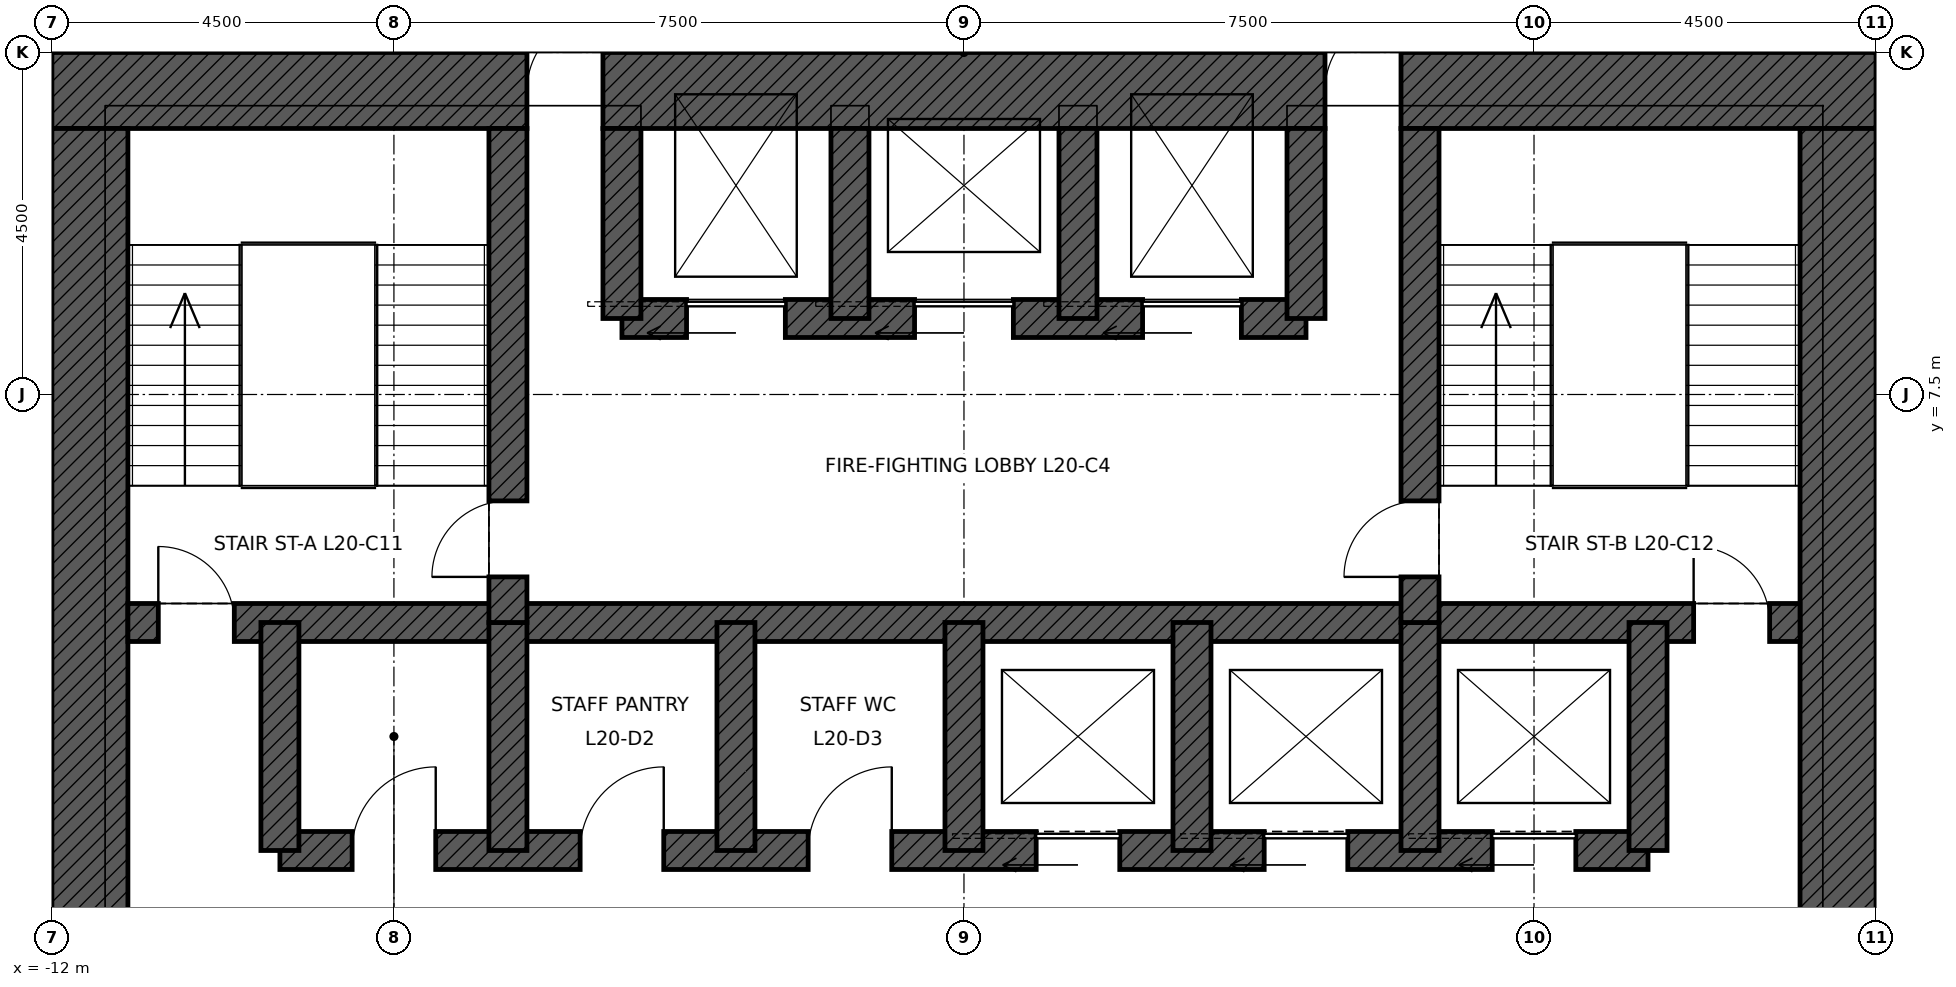
"""IFC4 building model, lengths in metres.
Left out: names, types, materials, properties, quantities, classifications, styles, units other than length and angle.
Written with IfcOpenShell. Run it as: python <this file> out.ifc"""

import sys

from ifc_helpers import new_model, si_unit, direction, frame, frame_2d, origin, place, context, subcontext, project, spatial, rectangle, extrude, element, fill, save


model = new_model("IFC4")
c1 = context("Model", 3, precision=1e-05, world=origin(), true_north=direction((0.0, 1.0)))
c2 = subcontext(c1, "Body", "Model", "MODEL_VIEW")
j1 = project(units=[si_unit("LENGTHUNIT", "METRE"), si_unit("PLANEANGLEUNIT", "RADIAN")], contexts=[c1])
p1 = place(None, origin())
s1 = spatial("IfcSite", under=j1, at=p1, CompositionType="ELEMENT")
p2 = place(p1, origin())
s2 = spatial("IfcBuilding", under=s1, at=p2, CompositionType="ELEMENT")
p3 = place(p2, frame((0.0, 0.0, 104.4)))
s3 = spatial("IfcBuildingStorey", under=s2, at=p3, CompositionType="ELEMENT", Elevation=104.4)
p4 = place(p3, frame((-12.0, 11.5, 0.0), z_axis=(0.0, 0.0, 1.0), x_axis=(1.0, 0.0, 0.0)))
e1 = element("IfcWall", 1, at=p4, inside=s3, PredefinedType="SHEAR", context=c2, shape_type="SweptSolid", body=[
    extrude(rectangle(XDim=24.0, YDim=1.0, at=frame_2d((12.0, 0.0))), origin(), (0.0, 0.0, 1.0), 4.5),
])
p5 = place(p4, frame((6.25, 0.0, 0.0)))
e2 = element("IfcOpeningElement", 2, at=p5, cuts=e1, PredefinedType="OPENING", context=c2, shape_type="SweptSolid", body=[
    extrude(rectangle(XDim=1.0, YDim=2.4, at=frame_2d((0.5, 1.2))), frame((0.0, 0.51, 0.0), z_axis=(0.0, -1.0, 0.0), x_axis=(1.0, 0.0, 0.0)), (0.0, 0.0, 1.0), 1.02),
])
p6 = place(p4, frame((16.75, 0.0, 0.0)))
e3 = element("IfcOpeningElement", 3, at=p6, cuts=e1, PredefinedType="OPENING", context=c2, shape_type="SweptSolid", body=[
    extrude(rectangle(XDim=1.0, YDim=2.4, at=frame_2d((0.5, 1.2))), frame((0.0, 0.51, 0.0), z_axis=(0.0, -1.0, 0.0), x_axis=(1.0, 0.0, 0.0)), (0.0, 0.0, 1.0), 1.02),
])
p7 = place(p3, frame((11.5, 11.0, 0.0), z_axis=(0.0, 0.0, 1.0), x_axis=(0.0, -1.0, 0.0)))
e4 = element("IfcWall", 4, at=p7, inside=s3, PredefinedType="SHEAR", context=c2, shape_type="SweptSolid", body=[
    extrude(rectangle(XDim=22.0, YDim=1.0, at=frame_2d((11.0, 0.0))), origin(), (0.0, 0.0, 1.0), 4.5),
])
p8 = place(p7, frame((10.5, 0.0, 0.0)))
e5 = element("IfcOpeningElement", 5, at=p8, cuts=e4, PredefinedType="OPENING", context=c2, shape_type="SweptSolid", body=[
    extrude(rectangle(XDim=1.0, YDim=2.4, at=frame_2d((0.5, 1.2))), frame((0.0, 0.51, 0.0), z_axis=(0.0, -1.0, 0.0), x_axis=(1.0, 0.0, 0.0)), (0.0, 0.0, 1.0), 1.02),
])
p9 = place(p3, frame((-11.5, -11.0, 0.0), z_axis=(0.0, 0.0, 1.0), x_axis=(0.0, 1.0, 0.0)))
e6 = element("IfcWall", 6, at=p9, inside=s3, PredefinedType="SHEAR", context=c2, shape_type="SweptSolid", body=[
    extrude(rectangle(XDim=22.0, YDim=1.0, at=frame_2d((11.0, 0.0))), origin(), (0.0, 0.0, 1.0), 4.5),
])
p10 = place(p9, frame((10.5, 0.0, 0.0)))
e7 = element("IfcOpeningElement", 7, at=p10, cuts=e6, PredefinedType="OPENING", context=c2, shape_type="SweptSolid", body=[
    extrude(rectangle(XDim=1.0, YDim=2.4, at=frame_2d((0.5, 1.2))), frame((0.0, 0.51, 0.0), z_axis=(0.0, -1.0, 0.0), x_axis=(1.0, 0.0, 0.0)), (0.0, 0.0, 1.0), 1.02),
])
p11 = place(p3, frame((-11.0, 4.5, 0.0), z_axis=(0.0, 0.0, 1.0), x_axis=(1.0, 0.0, 0.0)))
e8 = element("IfcWall", 8, at=p11, inside=s3, PredefinedType="SHEAR", context=c2, shape_type="SweptSolid", body=[
    extrude(rectangle(XDim=22.0, YDim=0.5, at=frame_2d((11.0, 0.0))), origin(), (0.0, 0.0, 1.0), 4.5),
])
p12 = place(p11, frame((0.4, 0.0, 0.0)))
e9 = element("IfcOpeningElement", 9, at=p12, cuts=e8, PredefinedType="OPENING", context=c2, shape_type="SweptSolid", body=[
    extrude(rectangle(XDim=1.0, YDim=2.1, at=frame_2d((0.5, 1.05))), frame((0.0, 0.26, 0.0), z_axis=(0.0, -1.0, 0.0), x_axis=(1.0, 0.0, 0.0)), (0.0, 0.0, 1.0), 0.52),
])
p13 = place(p11, frame((20.6, 0.0, 0.0)))
e10 = element("IfcOpeningElement", 10, at=p13, cuts=e8, PredefinedType="OPENING", context=c2, shape_type="SweptSolid", body=[
    extrude(rectangle(XDim=1.0, YDim=2.1, at=frame_2d((0.5, 1.05))), frame((0.0, 0.26, 0.0), z_axis=(0.0, -1.0, 0.0), x_axis=(1.0, 0.0, 0.0)), (0.0, 0.0, 1.0), 0.52),
])
p14 = place(p3, frame((-9.0, 1.5, 0.0), z_axis=(0.0, 0.0, 1.0), x_axis=(1.0, 0.0, 0.0)))
e11 = element("IfcWall", 11, at=p14, inside=s3, PredefinedType="SHEAR", context=c2, shape_type="SweptSolid", body=[
    extrude(rectangle(XDim=18.0, YDim=0.5, at=frame_2d((9.0, 0.0))), origin(), (0.0, 0.0, 1.0), 4.5),
])
p15 = place(p14, frame((9.95, 0.0, 0.0)))
e12 = element("IfcOpeningElement", 12, at=p15, cuts=e11, PredefinedType="OPENING", context=c2, shape_type="SweptSolid", body=[
    extrude(rectangle(XDim=1.1, YDim=2.1, at=frame_2d((0.55, 1.05))), frame((0.0, 0.26, 0.0), z_axis=(0.0, -1.0, 0.0), x_axis=(1.0, 0.0, 0.0)), (0.0, 0.0, 1.0), 0.52),
])
p16 = place(p14, frame((12.95, 0.0, 0.0)))
e13 = element("IfcOpeningElement", 13, at=p16, cuts=e11, PredefinedType="OPENING", context=c2, shape_type="SweptSolid", body=[
    extrude(rectangle(XDim=1.1, YDim=2.1, at=frame_2d((0.55, 1.05))), frame((0.0, 0.26, 0.0), z_axis=(0.0, -1.0, 0.0), x_axis=(1.0, 0.0, 0.0)), (0.0, 0.0, 1.0), 0.52),
])
p17 = place(p14, frame((15.95, 0.0, 0.0)))
e14 = element("IfcOpeningElement", 14, at=p17, cuts=e11, PredefinedType="OPENING", context=c2, shape_type="SweptSolid", body=[
    extrude(rectangle(XDim=1.1, YDim=2.1, at=frame_2d((0.55, 1.05))), frame((0.0, 0.26, 0.0), z_axis=(0.0, -1.0, 0.0), x_axis=(1.0, 0.0, 0.0)), (0.0, 0.0, 1.0), 0.52),
])
p18 = place(p14, frame((0.95, 0.0, 0.0)))
e15 = element("IfcOpeningElement", 15, at=p18, cuts=e11, PredefinedType="OPENING", context=c2, shape_type="SweptSolid", body=[
    extrude(rectangle(XDim=1.1, YDim=2.1, at=frame_2d((0.55, 1.05))), frame((0.0, 0.26, 0.0), z_axis=(0.0, -1.0, 0.0), x_axis=(1.0, 0.0, 0.0)), (0.0, 0.0, 1.0), 0.52),
])
p19 = place(p14, frame((3.95, 0.0, 0.0)))
e16 = element("IfcOpeningElement", 16, at=p19, cuts=e11, PredefinedType="OPENING", context=c2, shape_type="SweptSolid", body=[
    extrude(rectangle(XDim=1.1, YDim=2.1, at=frame_2d((0.55, 1.05))), frame((0.0, 0.26, 0.0), z_axis=(0.0, -1.0, 0.0), x_axis=(1.0, 0.0, 0.0)), (0.0, 0.0, 1.0), 0.52),
])
p20 = place(p14, frame((6.95, 0.0, 0.0)))
e17 = element("IfcOpeningElement", 17, at=p20, cuts=e11, PredefinedType="OPENING", context=c2, shape_type="SweptSolid", body=[
    extrude(rectangle(XDim=1.1, YDim=2.1, at=frame_2d((0.55, 1.05))), frame((0.0, 0.26, 0.0), z_axis=(0.0, -1.0, 0.0), x_axis=(1.0, 0.0, 0.0)), (0.0, 0.0, 1.0), 0.52),
])
p21 = place(p3, frame((-4.5, 8.5, 0.0), z_axis=(0.0, 0.0, 1.0), x_axis=(1.0, 0.0, 0.0)))
e18 = element("IfcWall", 18, at=p21, inside=s3, PredefinedType="SHEAR", context=c2, shape_type="SweptSolid", body=[
    extrude(rectangle(XDim=9.0, YDim=0.5, at=frame_2d((4.5, 0.0))), origin(), (0.0, 0.0, 1.0), 4.5),
])
p22 = place(p21, frame((0.85, 0.0, 0.0)))
e19 = element("IfcOpeningElement", 19, at=p22, cuts=e18, PredefinedType="OPENING", context=c2, shape_type="SweptSolid", body=[
    extrude(rectangle(XDim=1.3, YDim=2.4, at=frame_2d((0.65, 1.2))), frame((0.0, 0.26, 0.0), z_axis=(0.0, -1.0, 0.0), x_axis=(1.0, 0.0, 0.0)), (0.0, 0.0, 1.0), 0.52),
])
p23 = place(p21, frame((6.85, 0.0, 0.0)))
e20 = element("IfcOpeningElement", 20, at=p23, cuts=e18, PredefinedType="OPENING", context=c2, shape_type="SweptSolid", body=[
    extrude(rectangle(XDim=1.3, YDim=2.4, at=frame_2d((0.65, 1.2))), frame((0.0, 0.26, 0.0), z_axis=(0.0, -1.0, 0.0), x_axis=(1.0, 0.0, 0.0)), (0.0, 0.0, 1.0), 0.52),
])
p24 = place(p21, frame((3.85, 0.0, 0.0)))
e21 = element("IfcOpeningElement", 21, at=p24, cuts=e18, PredefinedType="OPENING", context=c2, shape_type="SweptSolid", body=[
    extrude(rectangle(XDim=1.3, YDim=2.4, at=frame_2d((0.65, 1.2))), frame((0.0, 0.26, 0.0), z_axis=(0.0, -1.0, 0.0), x_axis=(1.0, 0.0, 0.0)), (0.0, 0.0, 1.0), 0.52),
])
for number, where, z_axis, x_axis in (
    (22, (-9.0, 1.5, 0.0), (0.0, 0.0, 1.0), (0.0, 1.0, 0.0)),
    (23, (9.0, 1.5, 0.0), (0.0, 0.0, 1.0), (0.0, 1.0, 0.0)),
    (24, (-6.0, 1.5, 0.0), (0.0, 0.0, 1.0), (0.0, 1.0, 0.0)),
    (25, (-3.0, 1.5, 0.0), (0.0, 0.0, 1.0), (0.0, 1.0, 0.0)),
    (26, (0.0, 1.5, 0.0), (0.0, 0.0, 1.0), (0.0, 1.0, 0.0)),
    (27, (3.0, 1.5, 0.0), (0.0, 0.0, 1.0), (0.0, 1.0, 0.0)),
    (28, (6.0, 1.5, 0.0), (0.0, 0.0, 1.0), (0.0, 1.0, 0.0)),
):
    element("IfcWall", number, at=place(p3, frame(where, z_axis=z_axis, x_axis=x_axis)), inside=s3, PredefinedType="SHEAR", context=c2, shape_type="SweptSolid", body=[
        extrude(rectangle(XDim=3.0, YDim=0.5, at=frame_2d((1.5, 0.0))), origin(), (0.0, 0.0, 1.0), 4.5),
    ])
p25 = place(p3, frame((-6.0, 4.5, 0.0), z_axis=(0.0, 0.0, 1.0), x_axis=(0.0, 1.0, 0.0)))
e29 = element("IfcWall", 29, at=p25, inside=s3, PredefinedType="SHEAR", context=c2, shape_type="SweptSolid", body=[
    extrude(rectangle(XDim=6.5, YDim=0.5, at=frame_2d((3.25, 0.0))), origin(), (0.0, 0.0, 1.0), 4.5),
])
p26 = place(p25, frame((0.6, 0.0, 0.0)))
e30 = element("IfcOpeningElement", 30, at=p26, cuts=e29, PredefinedType="OPENING", context=c2, shape_type="SweptSolid", body=[
    extrude(rectangle(XDim=1.0, YDim=2.1, at=frame_2d((0.5, 1.05))), frame((0.0, 0.26, 0.0), z_axis=(0.0, -1.0, 0.0), x_axis=(1.0, 0.0, 0.0)), (0.0, 0.0, 1.0), 0.52),
])
p27 = place(p3, frame((6.0, 4.5, 0.0), z_axis=(0.0, 0.0, 1.0), x_axis=(0.0, 1.0, 0.0)))
e31 = element("IfcWall", 31, at=p27, inside=s3, PredefinedType="SHEAR", context=c2, shape_type="SweptSolid", body=[
    extrude(rectangle(XDim=6.5, YDim=0.5, at=frame_2d((3.25, 0.0))), origin(), (0.0, 0.0, 1.0), 4.5),
])
p28 = place(p27, frame((0.6, 0.0, 0.0)))
e32 = element("IfcOpeningElement", 32, at=p28, cuts=e31, PredefinedType="OPENING", context=c2, shape_type="SweptSolid", body=[
    extrude(rectangle(XDim=1.0, YDim=2.1, at=frame_2d((0.5, 1.05))), frame((0.0, 0.26, 0.0), z_axis=(0.0, -1.0, 0.0), x_axis=(1.0, 0.0, 0.0)), (0.0, 0.0, 1.0), 0.52),
])
for number, where, z_axis, x_axis in (
    (33, (-4.5, 8.5, 0.0), (0.0, 0.0, 1.0), (0.0, 1.0, 0.0)),
    (34, (4.5, 8.5, 0.0), (0.0, 0.0, 1.0), (0.0, 1.0, 0.0)),
    (35, (-1.5, 8.5, 0.0), (0.0, 0.0, 1.0), (0.0, 1.0, 0.0)),
    (36, (1.5, 8.5, 0.0), (0.0, 0.0, 1.0), (0.0, 1.0, 0.0)),
):
    element("IfcWall", number, at=place(p3, frame(where, z_axis=z_axis, x_axis=x_axis)), inside=s3, PredefinedType="SHEAR", context=c2, shape_type="SweptSolid", body=[
        extrude(rectangle(XDim=2.5, YDim=0.5, at=frame_2d((1.25, 0.0))), origin(), (0.0, 0.0, 1.0), 4.5),
    ])
p29 = place(p12, origin())
e37 = element("IfcDoor", 37, at=p29, inside=s3, OperationType="SINGLE_SWING_LEFT", PredefinedType="DOOR", context=c2, shape_type="SweptSolid", body=[
    extrude(rectangle(XDim=1.0, YDim=2.1, at=frame_2d((0.5, 1.05))), frame((0.0, 0.025, 0.0), z_axis=(0.0, -1.0, 0.0), x_axis=(1.0, 0.0, 0.0)), (0.0, 0.0, 1.0), 0.05),
])
fill(e9, e37)
p30 = place(p13, origin())
e38 = element("IfcDoor", 38, at=p30, inside=s3, OperationType="SINGLE_SWING_LEFT", PredefinedType="DOOR", context=c2, shape_type="SweptSolid", body=[
    extrude(rectangle(XDim=1.0, YDim=2.1, at=frame_2d((0.5, 1.05))), frame((0.0, 0.025, 0.0), z_axis=(0.0, -1.0, 0.0), x_axis=(1.0, 0.0, 0.0)), (0.0, 0.0, 1.0), 0.05),
])
fill(e10, e38)
p31 = place(p26, origin())
e39 = element("IfcDoor", 39, at=p31, inside=s3, OperationType="SINGLE_SWING_LEFT", PredefinedType="DOOR", context=c2, shape_type="SweptSolid", body=[
    extrude(rectangle(XDim=1.0, YDim=2.1, at=frame_2d((0.5, 1.05))), frame((0.0, 0.025, 0.0), z_axis=(0.0, -1.0, 0.0), x_axis=(1.0, 0.0, 0.0)), (0.0, 0.0, 1.0), 0.05),
])
fill(e30, e39)
p32 = place(p28, origin())
e40 = element("IfcDoor", 40, at=p32, inside=s3, OperationType="SINGLE_SWING_LEFT", PredefinedType="DOOR", context=c2, shape_type="SweptSolid", body=[
    extrude(rectangle(XDim=1.0, YDim=2.1, at=frame_2d((0.5, 1.05))), frame((0.0, 0.025, 0.0), z_axis=(0.0, -1.0, 0.0), x_axis=(1.0, 0.0, 0.0)), (0.0, 0.0, 1.0), 0.05),
])
fill(e32, e40)
p33 = place(p5, origin())
e41 = element("IfcDoor", 41, at=p33, inside=s3, OperationType="SINGLE_SWING_RIGHT", PredefinedType="DOOR", context=c2, shape_type="SweptSolid", body=[
    extrude(rectangle(XDim=1.0, YDim=2.4, at=frame_2d((0.5, 1.2))), frame((0.0, 0.485, 0.0), z_axis=(0.0, -1.0, 0.0), x_axis=(1.0, 0.0, 0.0)), (0.0, 0.0, 1.0), 0.05),
])
fill(e2, e41)
p34 = place(p6, origin())
e42 = element("IfcDoor", 42, at=p34, inside=s3, OperationType="SINGLE_SWING_RIGHT", PredefinedType="DOOR", context=c2, shape_type="SweptSolid", body=[
    extrude(rectangle(XDim=1.0, YDim=2.4, at=frame_2d((0.5, 1.2))), frame((0.0, 0.485, 0.0), z_axis=(0.0, -1.0, 0.0), x_axis=(1.0, 0.0, 0.0)), (0.0, 0.0, 1.0), 0.05),
])
fill(e3, e42)
p35 = place(p22, origin())
e43 = element("IfcDoor", 43, at=p35, inside=s3, OperationType="SLIDING_TO_LEFT", PredefinedType="DOOR", context=c2, shape_type="SweptSolid", body=[
    extrude(rectangle(XDim=1.3, YDim=2.4, at=frame_2d((0.65, 1.2))), frame((0.0, 0.025, 0.0), z_axis=(0.0, -1.0, 0.0), x_axis=(1.0, 0.0, 0.0)), (0.0, 0.0, 1.0), 0.05),
])
fill(e19, e43)
p36 = place(p23, origin())
e44 = element("IfcDoor", 44, at=p36, inside=s3, OperationType="SLIDING_TO_LEFT", PredefinedType="DOOR", context=c2, shape_type="SweptSolid", body=[
    extrude(rectangle(XDim=1.3, YDim=2.4, at=frame_2d((0.65, 1.2))), frame((0.0, 0.025, 0.0), z_axis=(0.0, -1.0, 0.0), x_axis=(1.0, 0.0, 0.0)), (0.0, 0.0, 1.0), 0.05),
])
fill(e20, e44)
p37 = place(p24, origin())
e45 = element("IfcDoor", 45, at=p37, inside=s3, OperationType="SLIDING_TO_LEFT", PredefinedType="DOOR", context=c2, shape_type="SweptSolid", body=[
    extrude(rectangle(XDim=1.3, YDim=2.4, at=frame_2d((0.65, 1.2))), frame((0.0, 0.025, 0.0), z_axis=(0.0, -1.0, 0.0), x_axis=(1.0, 0.0, 0.0)), (0.0, 0.0, 1.0), 0.05),
])
fill(e21, e45)
p38 = place(p15, origin())
e46 = element("IfcDoor", 46, at=p38, inside=s3, OperationType="SLIDING_TO_LEFT", PredefinedType="DOOR", context=c2, shape_type="SweptSolid", body=[
    extrude(rectangle(XDim=1.1, YDim=2.1, at=frame_2d((0.55, 1.05))), frame((0.0, 0.025, 0.0), z_axis=(0.0, -1.0, 0.0), x_axis=(1.0, 0.0, 0.0)), (0.0, 0.0, 1.0), 0.05),
])
fill(e12, e46)
p39 = place(p16, origin())
e47 = element("IfcDoor", 47, at=p39, inside=s3, OperationType="SLIDING_TO_LEFT", PredefinedType="DOOR", context=c2, shape_type="SweptSolid", body=[
    extrude(rectangle(XDim=1.1, YDim=2.1, at=frame_2d((0.55, 1.05))), frame((0.0, 0.025, 0.0), z_axis=(0.0, -1.0, 0.0), x_axis=(1.0, 0.0, 0.0)), (0.0, 0.0, 1.0), 0.05),
])
fill(e13, e47)
p40 = place(p17, origin())
e48 = element("IfcDoor", 48, at=p40, inside=s3, OperationType="SLIDING_TO_LEFT", PredefinedType="DOOR", context=c2, shape_type="SweptSolid", body=[
    extrude(rectangle(XDim=1.1, YDim=2.1, at=frame_2d((0.55, 1.05))), frame((0.0, 0.025, 0.0), z_axis=(0.0, -1.0, 0.0), x_axis=(1.0, 0.0, 0.0)), (0.0, 0.0, 1.0), 0.05),
])
fill(e14, e48)
p41 = place(p18, origin())
e49 = element("IfcDoor", 49, at=p41, inside=s3, OperationType="SINGLE_SWING_RIGHT", PredefinedType="DOOR", context=c2, shape_type="SweptSolid", body=[
    extrude(rectangle(XDim=1.1, YDim=2.1, at=frame_2d((0.55, 1.05))), frame((0.0, 0.025, 0.0), z_axis=(0.0, -1.0, 0.0), x_axis=(1.0, 0.0, 0.0)), (0.0, 0.0, 1.0), 0.05),
])
fill(e15, e49)
p42 = place(p19, origin())
e50 = element("IfcDoor", 50, at=p42, inside=s3, OperationType="SINGLE_SWING_RIGHT", PredefinedType="DOOR", context=c2, shape_type="SweptSolid", body=[
    extrude(rectangle(XDim=1.1, YDim=2.1, at=frame_2d((0.55, 1.05))), frame((0.0, 0.025, 0.0), z_axis=(0.0, -1.0, 0.0), x_axis=(1.0, 0.0, 0.0)), (0.0, 0.0, 1.0), 0.05),
])
fill(e16, e50)
p43 = place(p20, origin())
e51 = element("IfcDoor", 51, at=p43, inside=s3, OperationType="SINGLE_SWING_RIGHT", PredefinedType="DOOR", context=c2, shape_type="SweptSolid", body=[
    extrude(rectangle(XDim=1.1, YDim=2.1, at=frame_2d((0.55, 1.05))), frame((0.0, 0.025, 0.0), z_axis=(0.0, -1.0, 0.0), x_axis=(1.0, 0.0, 0.0)), (0.0, 0.0, 1.0), 0.05),
])
fill(e17, e51)
save(model, sys.argv[1])
